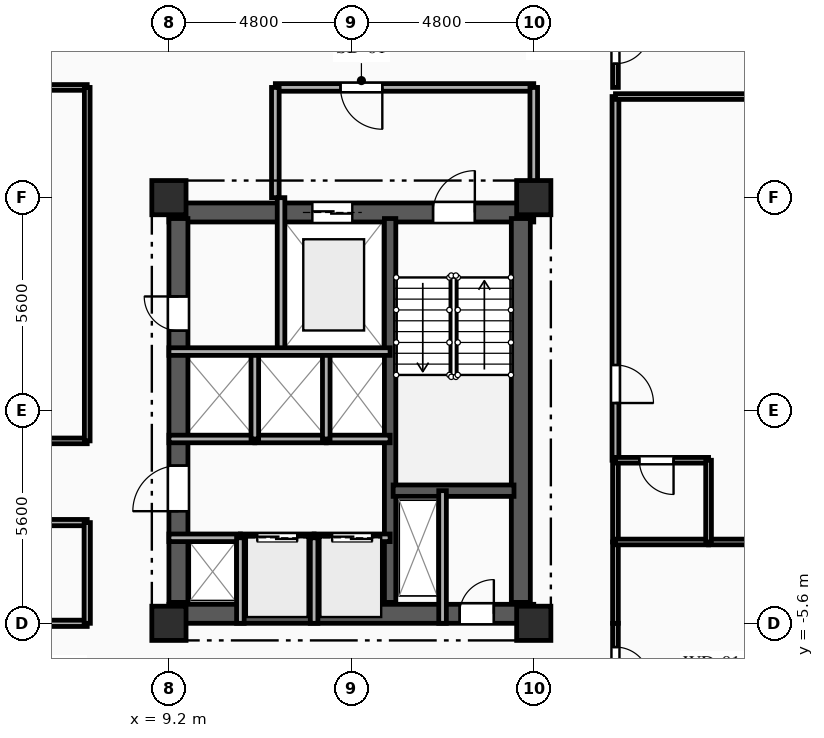
"""IFC4 building model, lengths in metres.
Left out: names, types, materials, properties, quantities, classifications, styles, units other than length and angle.
Written with IfcOpenShell. Run it as: python <this file> out.ifc"""

import sys

from ifc_helpers import new_model, si_unit, direction, frame, frame_2d, origin, origin_2d, place, context, subcontext, project, spatial, rectangle, extrude, element, fill, save


model = new_model("IFC4")
c1 = context("Model", 3, precision=1e-05, world=origin(), true_north=direction((0.0, 1.0)))
c2 = subcontext(c1, "Body", "Model", "MODEL_VIEW")
j1 = project(units=[si_unit("LENGTHUNIT", "METRE"), si_unit("PLANEANGLEUNIT", "RADIAN")], contexts=[c1])
p1 = place(None, origin())
s1 = spatial("IfcSite", under=j1, at=p1, CompositionType="ELEMENT")
p2 = place(p1, origin())
s2 = spatial("IfcBuilding", under=s1, at=p2, CompositionType="ELEMENT")
p3 = place(p2, frame((0.0, 0.0, 147.75)))
s3 = spatial("IfcBuildingStorey", under=s2, at=p3, CompositionType="ELEMENT", Elevation=147.75)
for number, where, z_axis, x_axis in (
    (1, (9.2, -5.6, 0.0), (0.0, 0.0, 1.0), (1.0, 0.0, 0.0)),
    (2, (9.2, 5.6, 0.0), (0.0, 0.0, 1.0), (1.0, 0.0, 0.0)),
    (3, (18.8, -5.6, 0.0), (0.0, 0.0, 1.0), (1.0, 0.0, 0.0)),
    (4, (18.8, 5.6, 0.0), (0.0, 0.0, 1.0), (1.0, 0.0, 0.0)),
):
    element("IfcColumn", number, at=place(p3, frame(where, z_axis=z_axis, x_axis=x_axis)), inside=s3, PredefinedType="COLUMN", context=c2, shape_type="SweptSolid", body=[
        extrude(rectangle(XDim=0.9, YDim=0.9, at=origin_2d()), origin(), (0.0, 0.0, 1.0), 3.35),
    ])
p4 = place(p3, frame((9.2, 5.21, 0.0), z_axis=(0.0, 0.0, 1.0), x_axis=(1.0, 0.0, 0.0)))
e5 = element("IfcWall", 5, at=p4, inside=s3, PredefinedType="SHEAR", context=c2, shape_type="SweptSolid", body=[
    extrude(rectangle(XDim=9.6, YDim=0.5, at=frame_2d((4.8, 0.0))), origin(), (0.0, 0.0, 1.0), 3.04),
])
p5 = place(p4, frame((6.95, 0.0, 0.0)))
e6 = element("IfcOpeningElement", 6, at=p5, cuts=e5, PredefinedType="OPENING", context=c2, shape_type="SweptSolid", body=[
    extrude(rectangle(XDim=1.1, YDim=2.15, at=frame_2d((0.55, 1.075))), frame((0.0, 0.26, 0.0), z_axis=(0.0, -1.0, 0.0), x_axis=(1.0, 0.0, 0.0)), (0.0, 0.0, 1.0), 0.52),
])
p6 = place(p4, frame((3.775, 0.0, 0.0)))
e7 = element("IfcOpeningElement", 7, at=p6, cuts=e5, PredefinedType="OPENING", context=c2, shape_type="SweptSolid", body=[
    extrude(rectangle(XDim=1.05, YDim=2.1, at=frame_2d((0.525, 1.05))), frame((0.0, 0.26, 0.0), z_axis=(0.0, -1.0, 0.0), x_axis=(1.0, 0.0, 0.0)), (0.0, 0.0, 1.0), 0.52),
])
p7 = place(p3, frame((9.2, -5.35, 0.0), z_axis=(0.0, 0.0, 1.0), x_axis=(1.0, 0.0, 0.0)))
e8 = element("IfcWall", 8, at=p7, inside=s3, PredefinedType="SHEAR", context=c2, shape_type="SweptSolid", body=[
    extrude(rectangle(XDim=9.6, YDim=0.5, at=frame_2d((4.8, 0.0))), origin(), (0.0, 0.0, 1.0), 3.04),
])
p8 = place(p7, frame((7.65, 0.0, 0.0)))
e9 = element("IfcOpeningElement", 9, at=p8, cuts=e8, PredefinedType="OPENING", context=c2, shape_type="SweptSolid", body=[
    extrude(rectangle(XDim=0.9, YDim=2.1, at=frame_2d((0.45, 1.05))), frame((0.0, 0.26, 0.0), z_axis=(0.0, -1.0, 0.0), x_axis=(1.0, 0.0, 0.0)), (0.0, 0.0, 1.0), 0.52),
])
p9 = place(p3, frame((9.45, -5.05, 0.0), z_axis=(0.0, 0.0, 1.0), x_axis=(0.0, 1.0, 0.0)))
e10 = element("IfcWall", 10, at=p9, inside=s3, PredefinedType="SHEAR", context=c2, shape_type="SweptSolid", body=[
    extrude(rectangle(XDim=10.1, YDim=0.5, at=frame_2d((5.05, 0.0))), origin(), (0.0, 0.0, 1.0), 3.04),
])
p10 = place(p9, frame((7.15, 0.0, 0.0)))
e11 = element("IfcOpeningElement", 11, at=p10, cuts=e10, PredefinedType="OPENING", context=c2, shape_type="SweptSolid", body=[
    extrude(rectangle(XDim=0.9, YDim=2.1, at=frame_2d((0.45, 1.05))), frame((0.0, 0.26, 0.0), z_axis=(0.0, -1.0, 0.0), x_axis=(1.0, 0.0, 0.0)), (0.0, 0.0, 1.0), 0.52),
])
p11 = place(p9, frame((2.4, 0.0, 0.0)))
e12 = element("IfcOpeningElement", 12, at=p11, cuts=e10, PredefinedType="OPENING", context=c2, shape_type="SweptSolid", body=[
    extrude(rectangle(XDim=1.2, YDim=2.15, at=frame_2d((0.6, 1.075))), frame((0.0, 0.26, 0.0), z_axis=(0.0, -1.0, 0.0), x_axis=(1.0, 0.0, 0.0)), (0.0, 0.0, 1.0), 0.52),
])
p12 = place(p3, frame((18.46, -5.05, 0.0), z_axis=(0.0, 0.0, 1.0), x_axis=(0.0, 1.0, 0.0)))
e13 = element("IfcWall", 13, at=p12, inside=s3, PredefinedType="SHEAR", context=c2, shape_type="SweptSolid", body=[
    extrude(rectangle(XDim=10.1, YDim=0.5, at=frame_2d((5.05, 0.0))), origin(), (0.0, 0.0, 1.0), 3.04),
])
p13 = place(p3, frame((15.02, -5.05, 0.0), z_axis=(0.0, 0.0, 1.0), x_axis=(0.0, 1.0, 0.0)))
e14 = element("IfcWall", 14, at=p13, inside=s3, PredefinedType="SHEAR", context=c2, shape_type="SweptSolid", body=[
    extrude(rectangle(XDim=10.1, YDim=0.3, at=frame_2d((5.05, 0.0))), origin(), (0.0, 0.0, 1.0), 3.04),
])
p14 = place(p3, frame((15.1, -2.11, 0.0), z_axis=(0.0, 0.0, 1.0), x_axis=(1.0, 0.0, 0.0)))
e15 = element("IfcWall", 15, at=p14, inside=s3, PredefinedType="SHEAR", context=c2, shape_type="SweptSolid", body=[
    extrude(rectangle(XDim=3.18, YDim=0.3, at=frame_2d((1.59, 0.0))), origin(), (0.0, 0.0, 1.0), 3.04),
])
p15 = place(p3, frame((16.4, -2.11, 0.0), z_axis=(0.0, 0.0, 1.0), x_axis=(0.0, -1.0, 0.0)))
e16 = element("IfcWall", 16, at=p15, inside=s3, PredefinedType="PARTITIONING", context=c2, shape_type="SweptSolid", body=[
    extrude(rectangle(XDim=3.49, YDim=0.2, at=frame_2d((1.745, 0.0))), origin(), (0.0, 0.0, 1.0), 3.04),
])
p16 = place(p3, frame((12.15, 5.6, 0.0), z_axis=(0.0, 0.0, 1.0), x_axis=(0.0, -1.0, 0.0)))
e17 = element("IfcWall", 17, at=p16, inside=s3, PredefinedType="PARTITIONING", context=c2, shape_type="SweptSolid", body=[
    extrude(rectangle(XDim=4.05, YDim=0.2, at=frame_2d((2.025, 0.0))), origin(), (0.0, 0.0, 1.0), 3.04),
])
p17 = place(p3, frame((18.8, 8.5, 0.0), z_axis=(0.0, 0.0, 1.0), x_axis=(-1.0, 0.0, 0.0)))
e18 = element("IfcWall", 18, at=p17, inside=s3, PredefinedType="PARTITIONING", context=c2, shape_type="SweptSolid", body=[
    extrude(rectangle(XDim=6.8, YDim=0.2, at=frame_2d((3.4, 0.0))), origin(), (0.0, 0.0, 1.0), 3.04),
])
p18 = place(p17, frame((3.985, 0.0, 0.0)))
e19 = element("IfcOpeningElement", 19, at=p18, cuts=e18, PredefinedType="OPENING", context=c2, shape_type="SweptSolid", body=[
    extrude(rectangle(XDim=1.1, YDim=2.15, at=frame_2d((0.55, 1.075))), frame((0.0, 0.11, 0.0), z_axis=(0.0, -1.0, 0.0), x_axis=(1.0, 0.0, 0.0)), (0.0, 0.0, 1.0), 0.22),
])
p19 = place(p3, frame((18.8, 5.6, 0.0), z_axis=(0.0, 0.0, 1.0), x_axis=(0.0, 1.0, 0.0)))
e20 = element("IfcWall", 20, at=p19, inside=s3, PredefinedType="PARTITIONING", context=c2, shape_type="SweptSolid", body=[
    extrude(rectangle(XDim=2.9, YDim=0.2, at=frame_2d((1.45, 0.0))), origin(), (0.0, 0.0, 1.0), 2.525),
])
p20 = place(p3, frame((12.0, 8.5, 0.0), z_axis=(0.0, 0.0, 1.0), x_axis=(0.0, -1.0, 0.0)))
e21 = element("IfcWall", 21, at=p20, inside=s3, PredefinedType="PARTITIONING", context=c2, shape_type="SweptSolid", body=[
    extrude(rectangle(XDim=2.9, YDim=0.2, at=frame_2d((1.45, 0.0))), origin(), (0.0, 0.0, 1.0), 3.04),
])
p21 = place(p3, frame((9.2, -3.35, 0.0), z_axis=(0.0, 0.0, 1.0), x_axis=(1.0, 0.0, 0.0)))
e22 = element("IfcWall", 22, at=p21, inside=s3, PredefinedType="PARTITIONING", context=c2, shape_type="SweptSolid", body=[
    extrude(rectangle(XDim=1.88, YDim=0.2, at=frame_2d((0.94, 0.0))), origin(), (0.0, 0.0, 1.0), 2.755),
])
p22 = place(p3, frame((11.08, -3.35, 0.0), z_axis=(0.0, 0.0, 1.0), x_axis=(1.0, 0.0, 0.0)))
e23 = element("IfcWall", 23, at=p22, inside=s3, PredefinedType="PARTITIONING", context=c2, shape_type="SweptSolid", body=[
    extrude(rectangle(XDim=1.94, YDim=0.2, at=frame_2d((0.97, 0.0))), origin(), (0.0, 0.0, 1.0), 3.04),
])
p23 = place(p22, frame((0.445, 0.0, 0.0)))
e24 = element("IfcOpeningElement", 24, at=p23, cuts=e23, PredefinedType="OPENING", context=c2, shape_type="SweptSolid", body=[
    extrude(rectangle(XDim=1.05, YDim=2.1, at=frame_2d((0.525, 1.05))), frame((0.0, 0.11, 0.0), z_axis=(0.0, -1.0, 0.0), x_axis=(1.0, 0.0, 0.0)), (0.0, 0.0, 1.0), 0.22),
])
p24 = place(p3, frame((13.02, -3.35, 0.0), z_axis=(0.0, 0.0, 1.0), x_axis=(1.0, 0.0, 0.0)))
e25 = element("IfcWall", 25, at=p24, inside=s3, PredefinedType="PARTITIONING", context=c2, shape_type="SweptSolid", body=[
    extrude(rectangle(XDim=2.0, YDim=0.2, at=frame_2d((1.0, 0.0))), origin(), (0.0, 0.0, 1.0), 3.04),
])
p25 = place(p24, frame((0.475, 0.0, 0.0)))
e26 = element("IfcOpeningElement", 26, at=p25, cuts=e25, PredefinedType="OPENING", context=c2, shape_type="SweptSolid", body=[
    extrude(rectangle(XDim=1.05, YDim=2.1, at=frame_2d((0.525, 1.05))), frame((0.0, 0.11, 0.0), z_axis=(0.0, -1.0, 0.0), x_axis=(1.0, 0.0, 0.0)), (0.0, 0.0, 1.0), 0.22),
])
p26 = place(p3, frame((11.46, -0.75, 0.0), z_axis=(0.0, 0.0, 1.0), x_axis=(-1.0, 0.0, 0.0)))
e27 = element("IfcWall", 27, at=p26, inside=s3, PredefinedType="PARTITIONING", context=c2, shape_type="SweptSolid", body=[
    extrude(rectangle(XDim=2.26, YDim=0.2, at=frame_2d((1.13, 0.0))), origin(), (0.0, 0.0, 1.0), 3.04),
])
p27 = place(p3, frame((13.34, -0.75, 0.0), z_axis=(0.0, 0.0, 1.0), x_axis=(-1.0, 0.0, 0.0)))
e28 = element("IfcWall", 28, at=p27, inside=s3, PredefinedType="PARTITIONING", context=c2, shape_type="SweptSolid", body=[
    extrude(rectangle(XDim=1.88, YDim=0.2, at=frame_2d((0.94, 0.0))), origin(), (0.0, 0.0, 1.0), 3.04),
])
p28 = place(p3, frame((15.02, -0.75, 0.0), z_axis=(0.0, 0.0, 1.0), x_axis=(-1.0, 0.0, 0.0)))
e29 = element("IfcWall", 29, at=p28, inside=s3, PredefinedType="PARTITIONING", context=c2, shape_type="SweptSolid", body=[
    extrude(rectangle(XDim=1.68, YDim=0.2, at=frame_2d((0.84, 0.0))), origin(), (0.0, 0.0, 1.0), 3.04),
])
for number, where, z_axis, x_axis in (
    (30, (11.08, -5.6, 0.0), (0.0, 0.0, 1.0), (0.0, 1.0, 0.0)),
    (31, (13.02, -5.6, 0.0), (0.0, 0.0, 1.0), (0.0, 1.0, 0.0)),
):
    element("IfcWall", number, at=place(p3, frame(where, z_axis=z_axis, x_axis=x_axis)), inside=s3, PredefinedType="PARTITIONING", context=c2, shape_type="SweptSolid", body=[
        extrude(rectangle(XDim=2.25, YDim=0.2, at=frame_2d((1.125, 0.0))), origin(), (0.0, 0.0, 1.0), 3.04),
    ])
for number, where, z_axis, x_axis in (
    (32, (11.46, -0.75, 0.0), (0.0, 0.0, 1.0), (0.0, 1.0, 0.0)),
    (33, (13.34, -0.75, 0.0), (0.0, 0.0, 1.0), (0.0, 1.0, 0.0)),
):
    element("IfcWall", number, at=place(p3, frame(where, z_axis=z_axis, x_axis=x_axis)), inside=s3, PredefinedType="PARTITIONING", context=c2, shape_type="SweptSolid", body=[
        extrude(rectangle(XDim=2.3, YDim=0.2, at=frame_2d((1.15, 0.0))), origin(), (0.0, 0.0, 1.0), 3.04),
    ])
p29 = place(p3, frame((20.95, 10.65, 0.0), z_axis=(0.0, 0.0, 1.0), x_axis=(0.0, -1.0, 0.0)))
e34 = element("IfcWall", 34, at=p29, inside=s3, PredefinedType="PARTITIONING", context=c2, shape_type="SweptSolid", body=[
    extrude(rectangle(XDim=2.15, YDim=0.15, at=frame_2d((1.075, 0.0))), origin(), (0.0, 0.0, 1.0), 3.04),
])
p30 = place(p29, frame((0.625, 0.0, 0.0)))
e35 = element("IfcOpeningElement", 35, at=p30, cuts=e34, PredefinedType="OPENING", context=c2, shape_type="SweptSolid", body=[
    extrude(rectangle(XDim=0.9, YDim=2.1, at=frame_2d((0.45, 1.05))), frame((0.0, 0.085, 0.0), z_axis=(0.0, -1.0, 0.0), x_axis=(1.0, 0.0, 0.0)), (0.0, 0.0, 1.0), 0.17),
])
p31 = place(p3, frame((7.05, 8.5, 0.0), z_axis=(0.0, 0.0, 1.0), x_axis=(-1.0, 0.0, 0.0)))
e36 = element("IfcWall", 36, at=p31, inside=s3, PredefinedType="PARTITIONING", context=c2, shape_type="SweptSolid", body=[
    extrude(rectangle(XDim=7.05, YDim=0.15, at=frame_2d((3.525, 0.0))), origin(), (0.0, 0.0, 1.0), 3.04),
])
p32 = place(p3, frame((20.95, -5.6, 0.0), z_axis=(0.0, 0.0, 1.0), x_axis=(0.0, -1.0, 0.0)))
e37 = element("IfcWall", 37, at=p32, inside=s3, PredefinedType="PARTITIONING", context=c2, shape_type="SweptSolid", body=[
    extrude(rectangle(XDim=2.15, YDim=0.15, at=frame_2d((1.075, 0.0))), origin(), (0.0, 0.0, 1.0), 3.04),
])
p33 = place(p32, frame((0.625, 0.0, 0.0)))
e38 = element("IfcOpeningElement", 38, at=p33, cuts=e37, PredefinedType="OPENING", context=c2, shape_type="SweptSolid", body=[
    extrude(rectangle(XDim=0.9, YDim=2.1, at=frame_2d((0.45, 1.05))), frame((0.0, 0.085, 0.0), z_axis=(0.0, -1.0, 0.0), x_axis=(1.0, 0.0, 0.0)), (0.0, 0.0, 1.0), 0.17),
])
p34 = place(p3, frame((0.0, -5.6, 0.0), z_axis=(0.0, 0.0, 1.0), x_axis=(1.0, 0.0, 0.0)))
e39 = element("IfcWall", 39, at=p34, inside=s3, PredefinedType="PARTITIONING", context=c2, shape_type="SweptSolid", body=[
    extrude(rectangle(XDim=7.05, YDim=0.165, at=frame_2d((3.525, 0.0))), origin(), (0.0, 0.0, 1.0), 2.525),
])
p35 = place(p3, frame((20.95, -3.46, 0.0), z_axis=(0.0, 0.0, 1.0), x_axis=(0.0, -1.0, 0.0)))
e40 = element("IfcWall", 40, at=p35, inside=s3, PredefinedType="PARTITIONING", context=c2, shape_type="SweptSolid", body=[
    extrude(rectangle(XDim=2.14, YDim=0.15, at=frame_2d((1.07, 0.0))), origin(), (0.0, 0.0, 1.0), 3.04),
])
p36 = place(p3, frame((20.95, 8.26, 0.0), z_axis=(0.0, 0.0, 1.0), x_axis=(0.0, -1.0, 0.0)))
e41 = element("IfcWall", 41, at=p36, inside=s3, PredefinedType="PARTITIONING", context=c2, shape_type="SweptSolid", body=[
    extrude(rectangle(XDim=9.57, YDim=0.18, at=frame_2d((4.785, 0.0))), origin(), (0.0, 0.0, 1.0), 3.04),
])
p37 = place(p36, frame((7.064, 0.0, 0.0)))
e42 = element("IfcOpeningElement", 42, at=p37, cuts=e41, PredefinedType="OPENING", context=c2, shape_type="SweptSolid", body=[
    extrude(rectangle(XDim=1.0, YDim=2.15, at=frame_2d((0.5, 1.075))), frame((0.0, 0.1, 0.0), z_axis=(0.0, -1.0, 0.0), x_axis=(1.0, 0.0, 0.0)), (0.0, 0.0, 1.0), 0.2),
])
p38 = place(p3, frame((20.95, -1.31, 0.0), z_axis=(0.0, 0.0, 1.0), x_axis=(0.0, -1.0, 0.0)))
e43 = element("IfcWall", 43, at=p38, inside=s3, PredefinedType="PLUMBINGWALL", context=c2, shape_type="SweptSolid", body=[
    extrude(rectangle(XDim=2.15, YDim=0.15, at=frame_2d((1.075, 0.0))), origin(), (0.0, 0.0, 1.0), 3.04),
])
p39 = place(p3, frame((-7.05, -0.8, 0.0), z_axis=(0.0, 0.0, 1.0), x_axis=(1.0, 0.0, 0.0)))
e44 = element("IfcWall", 44, at=p39, inside=s3, PredefinedType="PARTITIONING", context=c2, shape_type="SweptSolid", body=[
    extrude(rectangle(XDim=14.1, YDim=0.15, at=frame_2d((7.05, 0.0))), origin(), (0.0, 0.0, 1.0), 3.04),
])
p40 = place(p39, frame((6.525, 0.0, 0.0)))
e45 = element("IfcOpeningElement", 45, at=p40, cuts=e44, PredefinedType="OPENING", context=c2, shape_type="SweptSolid", body=[
    extrude(rectangle(XDim=1.05, YDim=2.15, at=frame_2d((0.525, 1.075))), frame((0.0, 0.085, 0.0), z_axis=(0.0, -1.0, 0.0), x_axis=(1.0, 0.0, 0.0)), (0.0, 0.0, 1.0), 0.17),
])
p41 = place(p3, frame((7.05, -2.95, 0.0), z_axis=(0.0, 0.0, 1.0), x_axis=(-1.0, 0.0, 0.0)))
e46 = element("IfcWall", 46, at=p41, inside=s3, PredefinedType="PARTITIONING", context=c2, shape_type="SweptSolid", body=[
    extrude(rectangle(XDim=14.1, YDim=0.165, at=frame_2d((7.05, 0.0))), origin(), (0.0, 0.0, 1.0), 3.04),
])
p42 = place(p41, frame((6.475, 0.0, 0.0)))
e47 = element("IfcOpeningElement", 47, at=p42, cuts=e46, PredefinedType="OPENING", context=c2, shape_type="SweptSolid", body=[
    extrude(rectangle(XDim=1.15, YDim=2.15, at=frame_2d((0.575, 1.075))), frame((0.0, 0.093, 0.0), z_axis=(0.0, -1.0, 0.0), x_axis=(1.0, 0.0, 0.0)), (0.0, 0.0, 1.0), 0.185),
])
p43 = place(p3, frame((7.05, -0.8, 0.0), z_axis=(0.0, 0.0, 1.0), x_axis=(0.0, 1.0, 0.0)))
e48 = element("IfcWall", 48, at=p43, inside=s3, PredefinedType="PARTITIONING", context=c2, shape_type="SweptSolid", body=[
    extrude(rectangle(XDim=9.3, YDim=0.15, at=frame_2d((4.65, 0.0))), origin(), (0.0, 0.0, 1.0), 3.04),
])
p44 = place(p3, frame((7.05, -5.6, 0.0), z_axis=(0.0, 0.0, 1.0), x_axis=(0.0, 1.0, 0.0)))
e49 = element("IfcWall", 49, at=p44, inside=s3, PredefinedType="PARTITIONING", context=c2, shape_type="SweptSolid", body=[
    extrude(rectangle(XDim=2.65, YDim=0.165, at=frame_2d((1.325, 0.0))), origin(), (0.0, 0.0, 1.0), 3.04),
])
p45 = place(p3, frame((23.4, -3.46, 0.0), z_axis=(0.0, 0.0, 1.0), x_axis=(1.0, 0.0, 0.0)))
e50 = element("IfcWall", 50, at=p45, inside=s3, PredefinedType="PARTITIONING", context=c2, shape_type="SweptSolid", body=[
    extrude(rectangle(XDim=3.6, YDim=0.15, at=frame_2d((1.8, 0.0))), origin(), (0.0, 0.0, 1.0), 3.04),
])
p46 = place(p3, frame((20.95, -3.46, 0.0), z_axis=(0.0, 0.0, 1.0), x_axis=(1.0, 0.0, 0.0)))
e51 = element("IfcWall", 51, at=p46, inside=s3, PredefinedType="PLUMBINGWALL", context=c2, shape_type="SweptSolid", body=[
    extrude(rectangle(XDim=2.45, YDim=0.15, at=frame_2d((1.225, 0.0))), origin(), (0.0, 0.0, 1.0), 3.04),
])
p47 = place(p3, frame((23.4, -1.31, 0.0), z_axis=(0.0, 0.0, 1.0), x_axis=(-1.0, 0.0, 0.0)))
e52 = element("IfcWall", 52, at=p47, inside=s3, PredefinedType="PLUMBINGWALL", context=c2, shape_type="SweptSolid", body=[
    extrude(rectangle(XDim=2.45, YDim=0.15, at=frame_2d((1.225, 0.0))), origin(), (0.0, 0.0, 1.0), 3.04),
])
p48 = place(p47, frame((0.921, 0.0, 0.0)))
e53 = element("IfcOpeningElement", 53, at=p48, cuts=e52, PredefinedType="OPENING", context=c2, shape_type="SweptSolid", body=[
    extrude(rectangle(XDim=0.9, YDim=2.1, at=frame_2d((0.45, 1.05))), frame((0.0, 0.085, 0.0), z_axis=(0.0, -1.0, 0.0), x_axis=(1.0, 0.0, 0.0)), (0.0, 0.0, 1.0), 0.17),
])
p49 = place(p3, frame((23.4, -3.46, 0.0), z_axis=(0.0, 0.0, 1.0), x_axis=(0.0, 1.0, 0.0)))
e54 = element("IfcWall", 54, at=p49, inside=s3, PredefinedType="PLUMBINGWALL", context=c2, shape_type="SweptSolid", body=[
    extrude(rectangle(XDim=2.15, YDim=0.15, at=frame_2d((1.075, 0.0))), origin(), (0.0, 0.0, 1.0), 3.04),
])
p50 = place(p3, frame((20.95, 8.26, 0.0), z_axis=(0.0, 0.0, 1.0), x_axis=(1.0, 0.0, 0.0)))
e55 = element("IfcWall", 55, at=p50, inside=s3, PredefinedType="PARTITIONING", context=c2, shape_type="SweptSolid", body=[
    extrude(rectangle(XDim=6.05, YDim=0.15, at=frame_2d((3.025, 0.0))), origin(), (0.0, 0.0, 1.0), 3.04),
])
p51 = place(p3, frame((9.2, 1.55, 0.0), z_axis=(0.0, 0.0, 1.0), x_axis=(1.0, 0.0, 0.0)))
e56 = element("IfcWall", 56, at=p51, inside=s3, PredefinedType="PARTITIONING", context=c2, shape_type="SweptSolid", body=[
    extrude(rectangle(XDim=5.82, YDim=0.2, at=frame_2d((2.91, 0.0))), origin(), (0.0, 0.0, 1.0), 3.04),
])
p52 = place(p5, origin())
e57 = element("IfcDoor", 57, at=p52, inside=s3, OperationType="SINGLE_SWING_RIGHT", PredefinedType="DOOR", context=c2, shape_type="SweptSolid", body=[
    extrude(rectangle(XDim=1.1, YDim=2.15, at=frame_2d((0.55, 1.075))), frame((0.0, 0.025, 0.0), z_axis=(0.0, -1.0, 0.0), x_axis=(1.0, 0.0, 0.0)), (0.0, 0.0, 1.0), 0.05),
])
fill(e6, e57)
p53 = place(p6, origin())
e58 = element("IfcDoor", 58, at=p53, inside=s3, OperationType="DOUBLE_DOOR_SLIDING", PredefinedType="DOOR", context=c2, shape_type="SweptSolid", body=[
    extrude(rectangle(XDim=1.05, YDim=2.1, at=frame_2d((0.525, 1.05))), frame((0.0, 0.025, 0.0), z_axis=(0.0, -1.0, 0.0), x_axis=(1.0, 0.0, 0.0)), (0.0, 0.0, 1.0), 0.05),
])
fill(e7, e58)
p54 = place(p8, origin())
e59 = element("IfcDoor", 59, at=p54, inside=s3, OperationType="SINGLE_SWING_RIGHT", PredefinedType="DOOR", context=c2, shape_type="SweptSolid", body=[
    extrude(rectangle(XDim=0.9, YDim=2.1, at=frame_2d((0.45, 1.05))), frame((0.0, 0.025, 0.0), z_axis=(0.0, -1.0, 0.0), x_axis=(1.0, 0.0, 0.0)), (0.0, 0.0, 1.0), 0.05),
])
fill(e9, e59)
p55 = place(p18, origin())
e60 = element("IfcDoor", 60, at=p55, inside=s3, OperationType="SINGLE_SWING_LEFT", PredefinedType="DOOR", context=c2, shape_type="SweptSolid", body=[
    extrude(rectangle(XDim=1.1, YDim=2.15, at=frame_2d((0.55, 1.075))), frame((0.0, 0.025, 0.0), z_axis=(0.0, -1.0, 0.0), x_axis=(1.0, 0.0, 0.0)), (0.0, 0.0, 1.0), 0.05),
])
fill(e19, e60)
p56 = place(p10, origin())
e61 = element("IfcDoor", 61, at=p56, inside=s3, OperationType="SINGLE_SWING_RIGHT", PredefinedType="DOOR", context=c2, shape_type="SweptSolid", body=[
    extrude(rectangle(XDim=0.9, YDim=2.1, at=frame_2d((0.45, 1.05))), frame((0.0, 0.025, 0.0), z_axis=(0.0, -1.0, 0.0), x_axis=(1.0, 0.0, 0.0)), (0.0, 0.0, 1.0), 0.05),
])
fill(e11, e61)
p57 = place(p23, origin())
e62 = element("IfcDoor", 62, at=p57, inside=s3, OperationType="DOUBLE_DOOR_SLIDING", PredefinedType="DOOR", context=c2, shape_type="SweptSolid", body=[
    extrude(rectangle(XDim=1.05, YDim=2.1, at=frame_2d((0.525, 1.05))), frame((0.0, 0.025, 0.0), z_axis=(0.0, -1.0, 0.0), x_axis=(1.0, 0.0, 0.0)), (0.0, 0.0, 1.0), 0.05),
])
fill(e24, e62)
p58 = place(p25, origin())
e63 = element("IfcDoor", 63, at=p58, inside=s3, OperationType="DOUBLE_DOOR_SLIDING", PredefinedType="DOOR", context=c2, shape_type="SweptSolid", body=[
    extrude(rectangle(XDim=1.05, YDim=2.1, at=frame_2d((0.525, 1.05))), frame((0.0, 0.025, 0.0), z_axis=(0.0, -1.0, 0.0), x_axis=(1.0, 0.0, 0.0)), (0.0, 0.0, 1.0), 0.05),
])
fill(e26, e63)
p59 = place(p11, origin())
e64 = element("IfcDoor", 64, at=p59, inside=s3, OperationType="SINGLE_SWING_LEFT", PredefinedType="DOOR", context=c2, shape_type="SweptSolid", body=[
    extrude(rectangle(XDim=1.2, YDim=2.15, at=frame_2d((0.6, 1.075))), frame((0.0, 0.025, 0.0), z_axis=(0.0, -1.0, 0.0), x_axis=(1.0, 0.0, 0.0)), (0.0, 0.0, 1.0), 0.05),
])
fill(e12, e64)
p60 = place(p30, origin())
e65 = element("IfcDoor", 65, at=p60, inside=s3, OperationType="SINGLE_SWING_LEFT", PredefinedType="DOOR", context=c2, shape_type="SweptSolid", body=[
    extrude(rectangle(XDim=0.9, YDim=2.1, at=frame_2d((0.45, 1.05))), frame((0.0, 0.025, 0.0), z_axis=(0.0, -1.0, 0.0), x_axis=(1.0, 0.0, 0.0)), (0.0, 0.0, 1.0), 0.05),
])
fill(e35, e65)
p61 = place(p33, origin())
e66 = element("IfcDoor", 66, at=p61, inside=s3, OperationType="SINGLE_SWING_RIGHT", PredefinedType="DOOR", context=c2, shape_type="SweptSolid", body=[
    extrude(rectangle(XDim=0.9, YDim=2.1, at=frame_2d((0.45, 1.05))), frame((0.0, 0.025, 0.0), z_axis=(0.0, -1.0, 0.0), x_axis=(1.0, 0.0, 0.0)), (0.0, 0.0, 1.0), 0.05),
])
fill(e38, e66)
p62 = place(p37, origin())
e67 = element("IfcDoor", 67, at=p62, inside=s3, OperationType="SINGLE_SWING_RIGHT", PredefinedType="DOOR", context=c2, shape_type="SweptSolid", body=[
    extrude(rectangle(XDim=1.0, YDim=2.15, at=frame_2d((0.5, 1.075))), frame((0.0, 0.025, 0.0), z_axis=(0.0, -1.0, 0.0), x_axis=(1.0, 0.0, 0.0)), (0.0, 0.0, 1.0), 0.05),
])
fill(e42, e67)
p63 = place(p48, origin())
e68 = element("IfcDoor", 68, at=p63, inside=s3, OperationType="SINGLE_SWING_LEFT", PredefinedType="DOOR", context=c2, shape_type="SweptSolid", body=[
    extrude(rectangle(XDim=0.9, YDim=2.1, at=frame_2d((0.45, 1.05))), frame((0.0, 0.025, 0.0), z_axis=(0.0, -1.0, 0.0), x_axis=(1.0, 0.0, 0.0)), (0.0, 0.0, 1.0), 0.05),
])
fill(e53, e68)
save(model, sys.argv[1])
